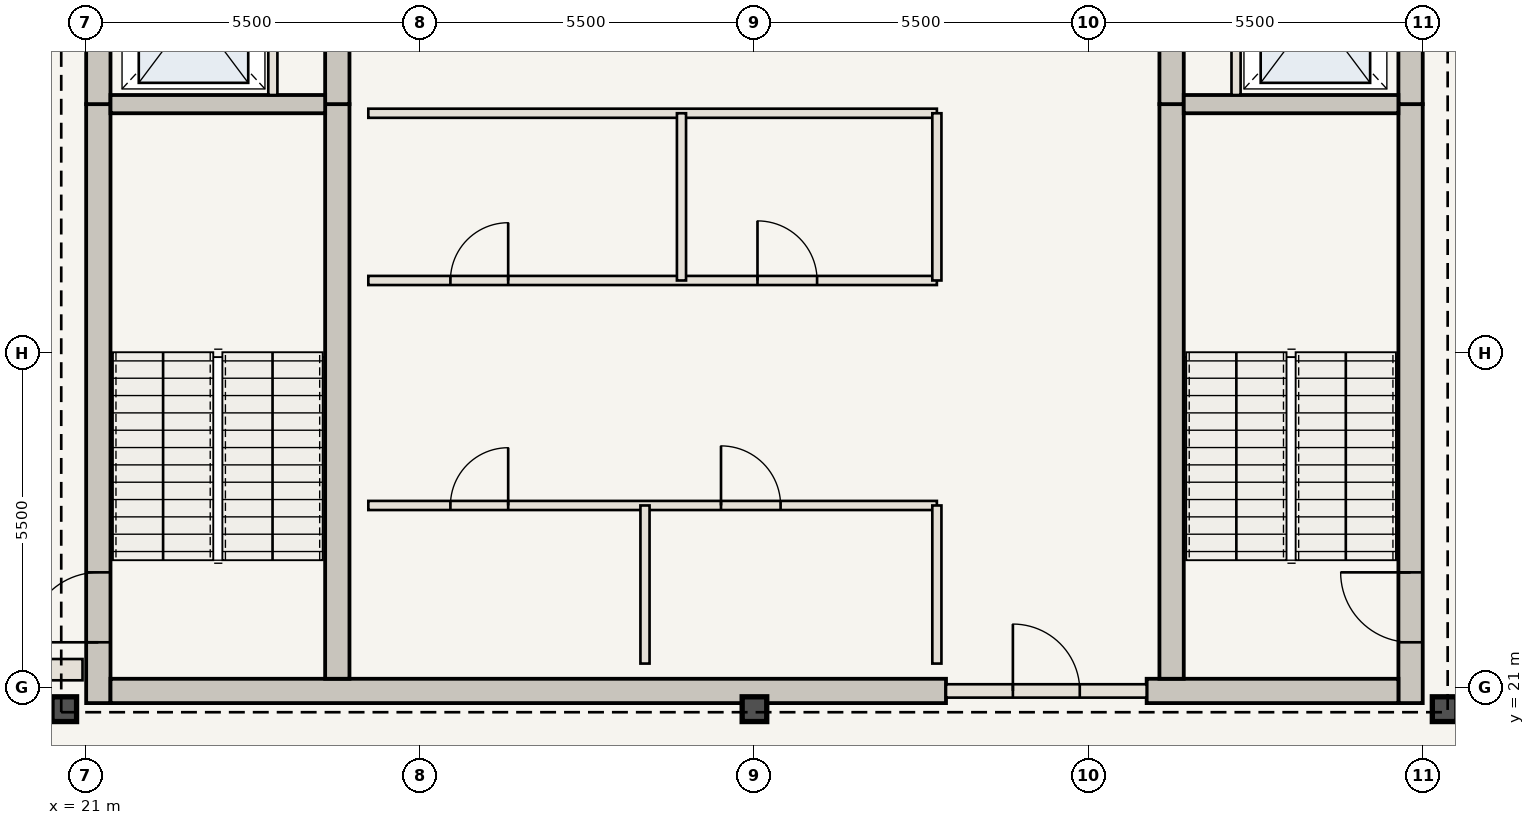
"""IFC4 building model, lengths in metres.
Left out: names, types, materials, properties, quantities, classifications, styles, units other than length and angle.
Written with IfcOpenShell. Run it as: python <this file> out.ifc"""

import sys

from ifc_helpers import new_model, si_unit, direction, frame, frame_2d, origin, origin_2d, place, context, subcontext, project, spatial, rectangle, i_section, extrude, element, fill, save


model = new_model("IFC4")
c1 = context("Model", 3, precision=1e-05, world=origin(), true_north=direction((0.0, 1.0)))
c2 = subcontext(c1, "Body", "Model", "MODEL_VIEW")
j1 = project(units=[si_unit("LENGTHUNIT", "METRE"), si_unit("PLANEANGLEUNIT", "RADIAN")], contexts=[c1])
p1 = place(None, origin())
s1 = spatial("IfcSite", under=j1, at=p1, CompositionType="ELEMENT")
p2 = place(p1, origin())
s2 = spatial("IfcBuilding", under=s1, at=p2, CompositionType="ELEMENT")
p3 = place(p2, frame((0.0, 0.0, 313.25)))
s3 = spatial("IfcBuildingStorey", under=s2, at=p3, CompositionType="ELEMENT", Elevation=313.25)
p4 = place(p3, frame((21.21, 20.75, 0.0), z_axis=(0.0, 0.0, 1.0), x_axis=(0.0, 1.0, 0.0)))
e1 = element("IfcWall", 1, at=p4, inside=s3, PredefinedType="SHEAR", context=c2, shape_type="SweptSolid", body=[
    extrude(rectangle(XDim=9.85, YDim=0.4, at=frame_2d((4.925, 0.0))), origin(), (0.0, 0.0, 1.0), 4.55),
])
p5 = place(p4, frame((1.0, 0.0, 0.0)))
e2 = element("IfcOpeningElement", 2, at=p5, cuts=e1, PredefinedType="OPENING", context=c2, shape_type="SweptSolid", body=[
    extrude(rectangle(XDim=1.15, YDim=2.15, at=frame_2d((0.575, 1.075))), frame((0.0, 0.21, 0.0), z_axis=(0.0, -1.0, 0.0), x_axis=(1.0, 0.0, 0.0)), (0.0, 0.0, 1.0), 0.42),
])
p6 = place(p3, frame((21.21, 30.6, 0.0), z_axis=(0.0, 0.0, 1.0), x_axis=(0.0, 1.0, 0.0)))
e3 = element("IfcWall", 3, at=p6, inside=s3, PredefinedType="SHEAR", context=c2, shape_type="SweptSolid", body=[
    extrude(rectangle(XDim=12.6, YDim=0.4, at=frame_2d((6.3, 0.0))), origin(), (0.0, 0.0, 1.0), 4.55),
])
p7 = place(p6, frame((4.2, 0.0, 0.0)))
e4 = element("IfcOpeningElement", 4, at=p7, cuts=e3, PredefinedType="OPENING", context=c2, shape_type="SweptSolid", body=[
    extrude(rectangle(XDim=1.1, YDim=2.15, at=frame_2d((0.55, 1.075))), frame((0.0, 0.21, 0.0), z_axis=(0.0, -1.0, 0.0), x_axis=(1.0, 0.0, 0.0)), (0.0, 0.0, 1.0), 0.42),
])
p8 = place(p6, frame((9.2, 0.0, 0.0)))
e5 = element("IfcOpeningElement", 5, at=p8, cuts=e3, PredefinedType="OPENING", context=c2, shape_type="SweptSolid", body=[
    extrude(rectangle(XDim=0.92, YDim=2.1, at=frame_2d((0.46, 1.05))), frame((0.0, 0.21, 0.0), z_axis=(0.0, -1.0, 0.0), x_axis=(1.0, 0.0, 0.0)), (0.0, 0.0, 1.0), 0.42),
])
p9 = place(p3, frame((42.79, 20.75, 0.0), z_axis=(0.0, 0.0, 1.0), x_axis=(0.0, 1.0, 0.0)))
e6 = element("IfcWall", 6, at=p9, inside=s3, PredefinedType="SHEAR", context=c2, shape_type="SweptSolid", body=[
    extrude(rectangle(XDim=9.85, YDim=0.4, at=frame_2d((4.925, 0.0))), origin(), (0.0, 0.0, 1.0), 4.55),
])
p10 = place(p9, frame((1.0, 0.0, 0.0)))
e7 = element("IfcOpeningElement", 7, at=p10, cuts=e6, PredefinedType="OPENING", context=c2, shape_type="SweptSolid", body=[
    extrude(rectangle(XDim=1.15, YDim=2.15, at=frame_2d((0.575, 1.075))), frame((0.0, 0.21, 0.0), z_axis=(0.0, -1.0, 0.0), x_axis=(1.0, 0.0, 0.0)), (0.0, 0.0, 1.0), 0.42),
])
p11 = place(p3, frame((42.79, 30.6, 0.0), z_axis=(0.0, 0.0, 1.0), x_axis=(0.0, 1.0, 0.0)))
e8 = element("IfcWall", 8, at=p11, inside=s3, PredefinedType="SHEAR", context=c2, shape_type="SweptSolid", body=[
    extrude(rectangle(XDim=12.6, YDim=0.4, at=frame_2d((6.3, 0.0))), origin(), (0.0, 0.0, 1.0), 4.55),
])
p12 = place(p11, frame((4.2, 0.0, 0.0)))
e9 = element("IfcOpeningElement", 9, at=p12, cuts=e8, PredefinedType="OPENING", context=c2, shape_type="SweptSolid", body=[
    extrude(rectangle(XDim=1.1, YDim=2.15, at=frame_2d((0.55, 1.075))), frame((0.0, 0.21, 0.0), z_axis=(0.0, -1.0, 0.0), x_axis=(1.0, 0.0, 0.0)), (0.0, 0.0, 1.0), 0.42),
])
p13 = place(p11, frame((8.4, 0.0, 0.0)))
e10 = element("IfcOpeningElement", 10, at=p13, cuts=e8, PredefinedType="OPENING", context=c2, shape_type="SweptSolid", body=[
    extrude(rectangle(XDim=0.88, YDim=2.1, at=frame_2d((0.44, 1.05))), frame((0.0, 0.21, 0.0), z_axis=(0.0, -1.0, 0.0), x_axis=(1.0, 0.0, 0.0)), (0.0, 0.0, 1.0), 0.42),
])
p14 = place(p11, frame((10.5, 0.0, 0.0)))
e11 = element("IfcOpeningElement", 11, at=p14, cuts=e8, PredefinedType="OPENING", context=c2, shape_type="SweptSolid", body=[
    extrude(rectangle(XDim=0.88, YDim=2.1, at=frame_2d((0.44, 1.05))), frame((0.0, 0.21, 0.0), z_axis=(0.0, -1.0, 0.0), x_axis=(1.0, 0.0, 0.0)), (0.0, 0.0, 1.0), 0.42),
])
p15 = place(p3, frame((21.41, 20.95, 0.0), z_axis=(0.0, 0.0, 1.0), x_axis=(1.0, 0.0, 0.0)))
e12 = element("IfcWall", 12, at=p15, inside=s3, PredefinedType="SHEAR", context=c2, shape_type="SweptSolid", body=[
    extrude(rectangle(XDim=13.74, YDim=0.4, at=frame_2d((6.87, 0.0))), origin(), (0.0, 0.0, 1.0), 4.55),
])
p16 = place(p3, frame((38.45, 20.95, 0.0), z_axis=(0.0, 0.0, 1.0), x_axis=(1.0, 0.0, 0.0)))
e13 = element("IfcWall", 13, at=p16, inside=s3, PredefinedType="SHEAR", context=c2, shape_type="SweptSolid", body=[
    extrude(rectangle(XDim=4.14, YDim=0.4, at=frame_2d((2.07, 0.0))), origin(), (0.0, 0.0, 1.0), 4.55),
])
p17 = place(p3, frame((25.14, 21.15, 0.0), z_axis=(0.0, 0.0, 1.0), x_axis=(0.0, 1.0, 0.0)))
e14 = element("IfcWall", 14, at=p17, inside=s3, PredefinedType="SHEAR", context=c2, shape_type="SweptSolid", body=[
    extrude(rectangle(XDim=9.45, YDim=0.4, at=frame_2d((4.725, 0.0))), origin(), (0.0, 0.0, 1.0), 4.55),
])
p18 = place(p3, frame((25.14, 30.6, 0.0), z_axis=(0.0, 0.0, 1.0), x_axis=(0.0, 1.0, 0.0)))
e15 = element("IfcWall", 15, at=p18, inside=s3, PredefinedType="SHEAR", context=c2, shape_type="SweptSolid", body=[
    extrude(rectangle(XDim=12.2, YDim=0.4, at=frame_2d((6.1, 0.0))), origin(), (0.0, 0.0, 1.0), 4.55),
])
p19 = place(p18, frame((6.25, 0.0, 0.0)))
e16 = element("IfcOpeningElement", 16, at=p19, cuts=e15, PredefinedType="OPENING", context=c2, shape_type="SweptSolid", body=[
    extrude(rectangle(XDim=1.1, YDim=2.15, at=frame_2d((0.55, 1.075))), frame((0.0, 0.21, 0.0), z_axis=(0.0, -1.0, 0.0), x_axis=(1.0, 0.0, 0.0)), (0.0, 0.0, 1.0), 0.42),
])
p20 = place(p3, frame((38.86, 21.15, 0.0), z_axis=(0.0, 0.0, 1.0), x_axis=(0.0, 1.0, 0.0)))
e17 = element("IfcWall", 17, at=p20, inside=s3, PredefinedType="SHEAR", context=c2, shape_type="SweptSolid", body=[
    extrude(rectangle(XDim=9.45, YDim=0.4, at=frame_2d((4.725, 0.0))), origin(), (0.0, 0.0, 1.0), 4.55),
])
p21 = place(p3, frame((38.86, 30.6, 0.0), z_axis=(0.0, 0.0, 1.0), x_axis=(0.0, 1.0, 0.0)))
e18 = element("IfcWall", 18, at=p21, inside=s3, PredefinedType="SHEAR", context=c2, shape_type="SweptSolid", body=[
    extrude(rectangle(XDim=12.2, YDim=0.4, at=frame_2d((6.1, 0.0))), origin(), (0.0, 0.0, 1.0), 4.55),
])
for number, where, z_axis, x_axis in (
    (19, (20.65, 20.65, 0.0), (0.0, 0.0, 1.0), (1.0, 0.0, 0.0)),
    (20, (32.0, 20.65, 0.0), (0.0, 0.0, 1.0), (1.0, 0.0, 0.0)),
    (21, (43.35, 20.65, 0.0), (0.0, 0.0, 1.0), (1.0, 0.0, 0.0)),
):
    element("IfcColumn", number, at=place(p3, frame(where, z_axis=z_axis, x_axis=x_axis)), inside=s3, PredefinedType="COLUMN", context=c2, shape_type="SweptSolid", body=[
        extrude(i_section(OverallWidth=0.404, OverallDepth=0.407, WebThickness=0.027, FlangeThickness=0.044, at=origin_2d()), origin(), (0.0, 0.0, 1.0), 4.55),
    ])
for number, where, z_axis, x_axis in (
    (22, (21.41, 30.6, 0.0), (0.0, 0.0, 1.0), (1.0, 0.0, 0.0)),
    (23, (39.06, 30.6, 0.0), (0.0, 0.0, 1.0), (1.0, 0.0, 0.0)),
):
    element("IfcWall", number, at=place(p3, frame(where, z_axis=z_axis, x_axis=x_axis)), inside=s3, PredefinedType="SHEAR", context=c2, shape_type="SweptSolid", body=[
        extrude(rectangle(XDim=3.53, YDim=0.3, at=frame_2d((1.765, 0.0))), origin(), (0.0, 0.0, 1.0), 4.29),
    ])
for number, where, z_axis, x_axis in (
    (24, (24.08, 30.75, 0.0), (0.0, 0.0, 1.0), (0.0, 1.0, 0.0)),
    (25, (39.92, 30.75, 0.0), (0.0, 0.0, 1.0), (0.0, 1.0, 0.0)),
):
    element("IfcWall", number, at=place(p3, frame(where, z_axis=z_axis, x_axis=x_axis)), inside=s3, PredefinedType="STANDARD", context=c2, shape_type="SweptSolid", body=[
        extrude(rectangle(XDim=2.65, YDim=0.15, at=frame_2d((1.325, 0.0))), origin(), (0.0, 0.0, 1.0), 4.29),
    ])
p22 = place(p3, frame((35.15, 20.95, 0.0), z_axis=(0.0, 0.0, 1.0), x_axis=(1.0, 0.0, 0.0)))
e26 = element("IfcWall", 26, at=p22, inside=s3, PredefinedType="STANDARD", context=c2, shape_type="SweptSolid", body=[
    extrude(rectangle(XDim=3.3, YDim=0.22, at=frame_2d((1.65, 0.0))), origin(), (0.0, 0.0, 1.0), 4.29),
])
p23 = place(p22, frame((1.1, 0.0, 0.0)))
e27 = element("IfcOpeningElement", 27, at=p23, cuts=e26, PredefinedType="OPENING", context=c2, shape_type="SweptSolid", body=[
    extrude(rectangle(XDim=1.1, YDim=2.15, at=frame_2d((0.55, 1.075))), frame((0.0, 0.12, 0.0), z_axis=(0.0, -1.0, 0.0), x_axis=(1.0, 0.0, 0.0)), (0.0, 0.0, 1.0), 0.24),
])
p24 = place(p3, frame((25.65, 24.0, 0.0), z_axis=(0.0, 0.0, 1.0), x_axis=(1.0, 0.0, 0.0)))
e28 = element("IfcWall", 28, at=p24, inside=s3, PredefinedType="STANDARD", context=c2, shape_type="SweptSolid", body=[
    extrude(rectangle(XDim=9.35, YDim=0.15, at=frame_2d((4.675, 0.0))), origin(), (0.0, 0.0, 1.0), 4.29),
])
p25 = place(p24, frame((1.35, 0.0, 0.0)))
e29 = element("IfcOpeningElement", 29, at=p25, cuts=e28, PredefinedType="OPENING", context=c2, shape_type="SweptSolid", body=[
    extrude(rectangle(XDim=0.95, YDim=2.15, at=frame_2d((0.475, 1.075))), frame((0.0, 0.085, 0.0), z_axis=(0.0, -1.0, 0.0), x_axis=(1.0, 0.0, 0.0)), (0.0, 0.0, 1.0), 0.17),
])
p26 = place(p24, frame((5.8, 0.0, 0.0)))
e30 = element("IfcOpeningElement", 30, at=p26, cuts=e28, PredefinedType="OPENING", context=c2, shape_type="SweptSolid", body=[
    extrude(rectangle(XDim=0.98, YDim=2.2, at=frame_2d((0.49, 1.1))), frame((0.0, 0.085, 0.0), z_axis=(0.0, -1.0, 0.0), x_axis=(1.0, 0.0, 0.0)), (0.0, 0.0, 1.0), 0.17),
])
for number, where, z_axis, x_axis in (
    (31, (30.2, 21.4, 0.0), (0.0, 0.0, 1.0), (0.0, 1.0, 0.0)),
    (32, (35.0, 21.4, 0.0), (0.0, 0.0, 1.0), (0.0, 1.0, 0.0)),
):
    element("IfcWall", number, at=place(p3, frame(where, z_axis=z_axis, x_axis=x_axis)), inside=s3, PredefinedType="STANDARD", context=c2, shape_type="SweptSolid", body=[
        extrude(rectangle(XDim=2.6, YDim=0.15, at=frame_2d((1.3, 0.0))), origin(), (0.0, 0.0, 1.0), 4.29),
    ])
p27 = place(p3, frame((25.65, 27.7, 0.0), z_axis=(0.0, 0.0, 1.0), x_axis=(1.0, 0.0, 0.0)))
e33 = element("IfcWall", 33, at=p27, inside=s3, PredefinedType="STANDARD", context=c2, shape_type="SweptSolid", body=[
    extrude(rectangle(XDim=9.35, YDim=0.15, at=frame_2d((4.675, 0.0))), origin(), (0.0, 0.0, 1.0), 4.29),
])
p28 = place(p27, frame((1.35, 0.0, 0.0)))
e34 = element("IfcOpeningElement", 34, at=p28, cuts=e33, PredefinedType="OPENING", context=c2, shape_type="SweptSolid", body=[
    extrude(rectangle(XDim=0.95, YDim=2.15, at=frame_2d((0.475, 1.075))), frame((0.0, 0.085, 0.0), z_axis=(0.0, -1.0, 0.0), x_axis=(1.0, 0.0, 0.0)), (0.0, 0.0, 1.0), 0.17),
])
p29 = place(p27, frame((6.4, 0.0, 0.0)))
e35 = element("IfcOpeningElement", 35, at=p29, cuts=e33, PredefinedType="OPENING", context=c2, shape_type="SweptSolid", body=[
    extrude(rectangle(XDim=0.98, YDim=2.2, at=frame_2d((0.49, 1.1))), frame((0.0, 0.085, 0.0), z_axis=(0.0, -1.0, 0.0), x_axis=(1.0, 0.0, 0.0)), (0.0, 0.0, 1.0), 0.17),
])
p30 = place(p3, frame((25.65, 30.45, 0.0), z_axis=(0.0, 0.0, 1.0), x_axis=(1.0, 0.0, 0.0)))
e36 = element("IfcWall", 36, at=p30, inside=s3, PredefinedType="STANDARD", context=c2, shape_type="SweptSolid", body=[
    extrude(rectangle(XDim=9.35, YDim=0.15, at=frame_2d((4.675, 0.0))), origin(), (0.0, 0.0, 1.0), 4.29),
])
for number, where, z_axis, x_axis in (
    (37, (30.8, 27.7, 0.0), (0.0, 0.0, 1.0), (0.0, 1.0, 0.0)),
    (38, (35.0, 27.7, 0.0), (0.0, 0.0, 1.0), (0.0, 1.0, 0.0)),
):
    element("IfcWall", number, at=place(p3, frame(where, z_axis=z_axis, x_axis=x_axis)), inside=s3, PredefinedType="STANDARD", context=c2, shape_type="SweptSolid", body=[
        extrude(rectangle(XDim=2.75, YDim=0.15, at=frame_2d((1.375, 0.0))), origin(), (0.0, 0.0, 1.0), 4.29),
    ])
p31 = place(p3, frame((18.4, 21.3, 0.0), z_axis=(0.0, 0.0, 1.0), x_axis=(1.0, 0.0, 0.0)))
e39 = element("IfcWall", 39, at=p31, inside=s3, PredefinedType="STANDARD", context=c2, shape_type="SweptSolid", body=[
    extrude(rectangle(XDim=2.55, YDim=0.35, at=frame_2d((1.275, 0.0))), origin(), (0.0, 0.0, 1.0), 4.29),
])
p32 = place(p5, origin())
e40 = element("IfcDoor", 40, at=p32, inside=s3, OperationType="SINGLE_SWING_LEFT", PredefinedType="DOOR", context=c2, shape_type="SweptSolid", body=[
    extrude(rectangle(XDim=1.15, YDim=2.15, at=frame_2d((0.575, 1.075))), frame((0.0, 0.025, 0.0), z_axis=(0.0, -1.0, 0.0), x_axis=(1.0, 0.0, 0.0)), (0.0, 0.0, 1.0), 0.05),
])
fill(e2, e40)
p33 = place(p10, origin())
e41 = element("IfcDoor", 41, at=p33, inside=s3, OperationType="SINGLE_SWING_RIGHT", PredefinedType="DOOR", context=c2, shape_type="SweptSolid", body=[
    extrude(rectangle(XDim=1.15, YDim=2.15, at=frame_2d((0.575, 1.075))), frame((0.0, 0.025, 0.0), z_axis=(0.0, -1.0, 0.0), x_axis=(1.0, 0.0, 0.0)), (0.0, 0.0, 1.0), 0.05),
])
fill(e7, e41)
p34 = place(p23, origin())
e42 = element("IfcDoor", 42, at=p34, inside=s3, OperationType="SINGLE_SWING_LEFT", PredefinedType="DOOR", context=c2, shape_type="SweptSolid", body=[
    extrude(rectangle(XDim=1.1, YDim=2.15, at=frame_2d((0.55, 1.075))), frame((0.0, 0.025, 0.0), z_axis=(0.0, -1.0, 0.0), x_axis=(1.0, 0.0, 0.0)), (0.0, 0.0, 1.0), 0.05),
])
fill(e27, e42)
p35 = place(p25, origin())
e43 = element("IfcDoor", 43, at=p35, inside=s3, OperationType="SINGLE_SWING_RIGHT", PredefinedType="DOOR", context=c2, shape_type="SweptSolid", body=[
    extrude(rectangle(XDim=0.95, YDim=2.15, at=frame_2d((0.475, 1.075))), frame((0.0, 0.025, 0.0), z_axis=(0.0, -1.0, 0.0), x_axis=(1.0, 0.0, 0.0)), (0.0, 0.0, 1.0), 0.05),
])
fill(e29, e43)
p36 = place(p26, origin())
e44 = element("IfcDoor", 44, at=p36, inside=s3, OperationType="SINGLE_SWING_LEFT", PredefinedType="DOOR", context=c2, shape_type="SweptSolid", body=[
    extrude(rectangle(XDim=0.98, YDim=2.2, at=frame_2d((0.49, 1.1))), frame((0.0, 0.025, 0.0), z_axis=(0.0, -1.0, 0.0), x_axis=(1.0, 0.0, 0.0)), (0.0, 0.0, 1.0), 0.05),
])
fill(e30, e44)
p37 = place(p28, origin())
e45 = element("IfcDoor", 45, at=p37, inside=s3, OperationType="SINGLE_SWING_RIGHT", PredefinedType="DOOR", context=c2, shape_type="SweptSolid", body=[
    extrude(rectangle(XDim=0.95, YDim=2.15, at=frame_2d((0.475, 1.075))), frame((0.0, 0.025, 0.0), z_axis=(0.0, -1.0, 0.0), x_axis=(1.0, 0.0, 0.0)), (0.0, 0.0, 1.0), 0.05),
])
fill(e34, e45)
p38 = place(p29, origin())
e46 = element("IfcDoor", 46, at=p38, inside=s3, OperationType="SINGLE_SWING_LEFT", PredefinedType="DOOR", context=c2, shape_type="SweptSolid", body=[
    extrude(rectangle(XDim=0.98, YDim=2.2, at=frame_2d((0.49, 1.1))), frame((0.0, 0.025, 0.0), z_axis=(0.0, -1.0, 0.0), x_axis=(1.0, 0.0, 0.0)), (0.0, 0.0, 1.0), 0.05),
])
fill(e35, e46)
save(model, sys.argv[1])
